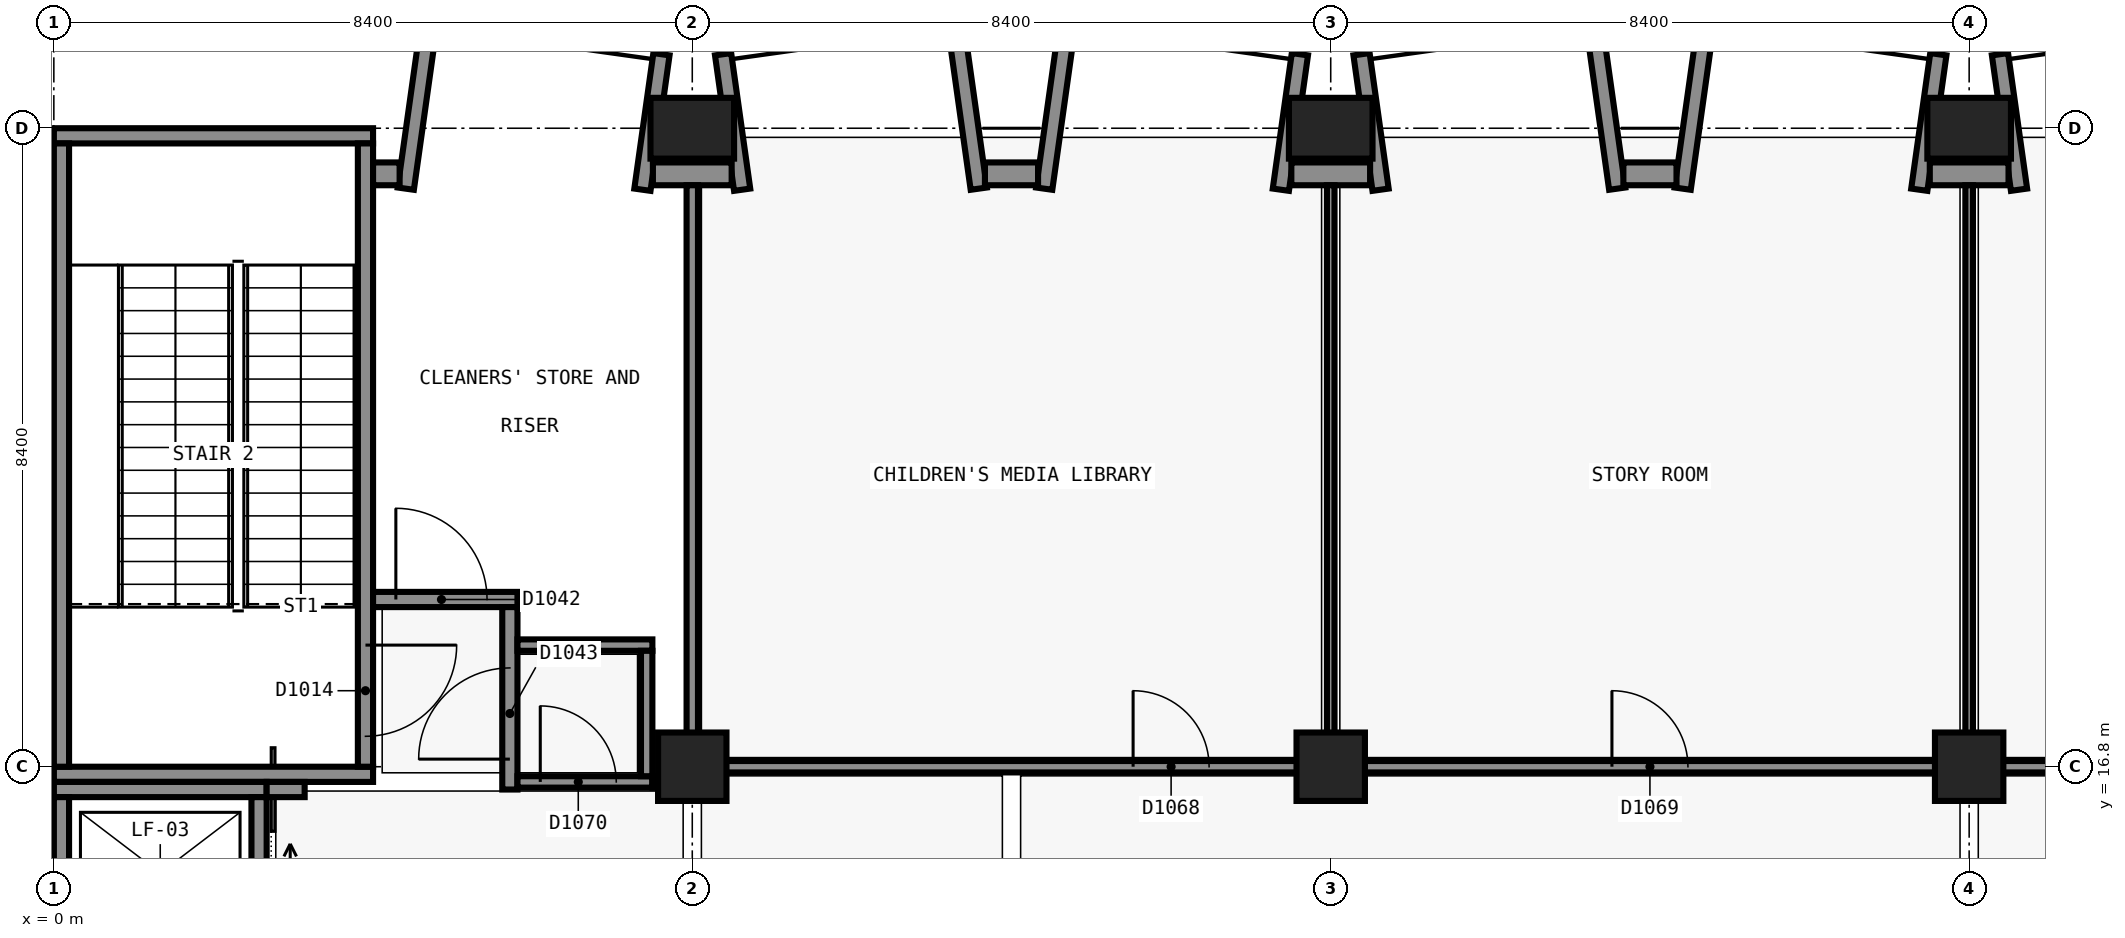
"""IFC4 building model, lengths in metres.
Left out: names, types, materials, properties, quantities, classifications, styles, units other than length and angle.
Written with IfcOpenShell. Run it as: python <this file> out.ifc"""

import sys

from ifc_helpers import new_model, si_unit, direction, frame, frame_2d, origin, origin_2d, place, context, subcontext, project, spatial, rectangle, extrude, element, fill, save


model = new_model("IFC4")
c1 = context("Model", 3, precision=1e-05, world=origin(), true_north=direction((0.0, 1.0)))
c2 = subcontext(c1, "Body", "Model", "MODEL_VIEW")
j1 = project(units=[si_unit("LENGTHUNIT", "METRE"), si_unit("PLANEANGLEUNIT", "RADIAN")], contexts=[c1])
p1 = place(None, origin())
s1 = spatial("IfcSite", under=j1, at=p1, CompositionType="ELEMENT")
p2 = place(p1, origin())
s2 = spatial("IfcBuilding", under=s1, at=p2, CompositionType="ELEMENT")
p3 = place(p2, frame((0.0, 0.0, 5.4)))
s3 = spatial("IfcBuildingStorey", under=s2, at=p3, CompositionType="ELEMENT", Elevation=5.4)
for number, where, z_axis, x_axis in (
    (1, (4.2, 16.7, 0.0), (0.0, 0.0, 1.0), (-1.0, 0.0, 0.0)),
    (2, (0.0, 25.1, 0.0), (0.0, 0.0, 1.0), (1.0, 0.0, 0.0)),
):
    element("IfcWall", number, at=place(p3, frame(where, z_axis=z_axis, x_axis=x_axis)), inside=s3, PredefinedType="SHEAR", context=c2, shape_type="SweptSolid", body=[
        extrude(rectangle(XDim=4.199, YDim=0.2, at=frame_2d((2.1, 0.0))), origin(), (0.0, 0.0, 1.0), 4.8),
    ])
p4 = place(p3, frame((0.1, 16.8, 0.0), z_axis=(0.0, 0.0, 1.0), x_axis=(0.0, 1.0, 0.0)))
e3 = element("IfcWall", 3, at=p4, inside=s3, PredefinedType="SHEAR", context=c2, shape_type="SweptSolid", body=[
    extrude(rectangle(XDim=8.2, YDim=0.2, at=frame_2d((4.1, 0.0))), origin(), (0.0, 0.0, 1.0), 4.8),
])
p5 = place(p3, frame((4.1, 25.0, 0.0), z_axis=(0.0, 0.0, 1.0), x_axis=(0.0, -1.0, 0.0)))
e4 = element("IfcWall", 4, at=p5, inside=s3, PredefinedType="SHEAR", context=c2, shape_type="SweptSolid", body=[
    extrude(rectangle(XDim=8.2, YDim=0.2, at=frame_2d((4.1, 0.0))), origin(), (0.0, 0.0, 1.0), 4.8),
])
p6 = place(p5, frame((6.6, 0.0, 0.0)))
e5 = element("IfcOpeningElement", 5, at=p6, cuts=e4, PredefinedType="OPENING", context=c2, shape_type="SweptSolid", body=[
    extrude(rectangle(XDim=1.2, YDim=2.1, at=frame_2d((0.6, 1.05))), frame((0.0, 0.11, 0.0), z_axis=(0.0, -1.0, 0.0), x_axis=(1.0, 0.0, 0.0)), (0.0, 0.0, 1.0), 0.22),
])
p7 = place(p3, frame((0.0, 16.5, 0.0), z_axis=(0.0, 0.0, 1.0), x_axis=(1.0, 0.0, 0.0)))
e6 = element("IfcWall", 6, at=p7, inside=s3, PredefinedType="SHEAR", context=c2, shape_type="SweptSolid", body=[
    extrude(rectangle(XDim=2.8, YDim=0.2, at=frame_2d((1.4, 0.0))), origin(), (0.0, 0.0, 1.0), 4.8),
])
p8 = place(p3, frame((0.1, 14.3, 0.0), z_axis=(0.0, 0.0, 1.0), x_axis=(0.0, 1.0, 0.0)))
e7 = element("IfcWall", 7, at=p8, inside=s3, PredefinedType="SHEAR", context=c2, shape_type="SweptSolid", body=[
    extrude(rectangle(XDim=2.1, YDim=0.2, at=frame_2d((1.05, 0.0))), origin(), (0.0, 0.0, 1.0), 4.8),
])
p9 = place(p3, frame((2.7, 16.4, 0.0), z_axis=(0.0, 0.0, 1.0), x_axis=(0.0, -1.0, 0.0)))
e8 = element("IfcWall", 8, at=p9, inside=s3, PredefinedType="SHEAR", context=c2, shape_type="SweptSolid", body=[
    extrude(rectangle(XDim=2.1, YDim=0.2, at=frame_2d((1.05, 0.0))), origin(), (0.0, 0.0, 1.0), 4.8),
])
p10 = place(p9, frame((0.45, 0.0, 0.0)))
e9 = element("IfcOpeningElement", 9, at=p10, cuts=e8, PredefinedType="OPENING", context=c2, shape_type="SweptSolid", body=[
    extrude(rectangle(XDim=1.1, YDim=2.1, at=frame_2d((0.55, 1.05))), frame((0.0, 0.11, 0.0), z_axis=(0.0, -1.0, 0.0), x_axis=(1.0, 0.0, 0.0)), (0.0, 0.0, 1.0), 0.22),
])
p11 = place(p3, frame((8.4, 16.8, 0.0), z_axis=(0.0, 0.0, 1.0), x_axis=(1.0, 0.0, 0.0)))
e10 = element("IfcColumn", 10, at=p11, inside=s3, PredefinedType="COLUMN", context=c2, shape_type="SweptSolid", body=[
    extrude(rectangle(XDim=0.9, YDim=0.9, at=origin_2d()), origin(), (0.0, 0.0, 1.0), 4.8),
])
p12 = place(p3, frame((8.4, 25.2, 0.0), z_axis=(0.0, 0.0, 1.0), x_axis=(1.0, 0.0, 0.0)))
e11 = element("IfcColumn", 11, at=p12, inside=s3, PredefinedType="COLUMN", context=c2, shape_type="SweptSolid", body=[
    extrude(rectangle(XDim=1.1, YDim=0.8, at=origin_2d()), origin(), (0.0, 0.0, 1.0), 4.8),
])
p13 = place(p3, frame((16.8, 16.8, 0.0), z_axis=(0.0, 0.0, 1.0), x_axis=(1.0, 0.0, 0.0)))
e12 = element("IfcColumn", 12, at=p13, inside=s3, PredefinedType="COLUMN", context=c2, shape_type="SweptSolid", body=[
    extrude(rectangle(XDim=0.9, YDim=0.9, at=origin_2d()), origin(), (0.0, 0.0, 1.0), 4.8),
])
p14 = place(p3, frame((16.8, 25.2, 0.0), z_axis=(0.0, 0.0, 1.0), x_axis=(1.0, 0.0, 0.0)))
e13 = element("IfcColumn", 13, at=p14, inside=s3, PredefinedType="COLUMN", context=c2, shape_type="SweptSolid", body=[
    extrude(rectangle(XDim=1.1, YDim=0.8, at=origin_2d()), origin(), (0.0, 0.0, 1.0), 4.8),
])
p15 = place(p3, frame((25.2, 16.8, 0.0), z_axis=(0.0, 0.0, 1.0), x_axis=(1.0, 0.0, 0.0)))
e14 = element("IfcColumn", 14, at=p15, inside=s3, PredefinedType="COLUMN", context=c2, shape_type="SweptSolid", body=[
    extrude(rectangle(XDim=0.9, YDim=0.9, at=origin_2d()), origin(), (0.0, 0.0, 1.0), 4.8),
])
p16 = place(p3, frame((25.2, 25.2, 0.0), z_axis=(0.0, 0.0, 1.0), x_axis=(1.0, 0.0, 0.0)))
e15 = element("IfcColumn", 15, at=p16, inside=s3, PredefinedType="COLUMN", context=c2, shape_type="SweptSolid", body=[
    extrude(rectangle(XDim=1.1, YDim=0.8, at=origin_2d()), origin(), (0.0, 0.0, 1.0), 4.8),
])
p17 = place(p3, frame((2.8, 16.5, 0.0), z_axis=(0.0, 0.0, 1.0), x_axis=(1.0, 0.0, 0.0)))
e16 = element("IfcWall", 16, at=p17, inside=s3, PredefinedType="SHEAR", context=c2, shape_type="SweptSolid", body=[
    extrude(rectangle(XDim=0.5, YDim=0.2, at=frame_2d((0.25, 0.0))), origin(), (0.0, 0.0, 1.0), 4.8),
])
p18 = place(p3, frame((4.631, 24.405, 0.0), z_axis=(0.0, 0.0, 1.0), x_axis=(0.139141913905, 0.990272451295, 0.0)))
e17 = element("IfcWall", 17, at=p18, inside=s3, PredefinedType="SOLIDWALL", context=c2, shape_type="SweptSolid", body=[
    extrude(rectangle(XDim=2.219, YDim=0.215, at=frame_2d((1.11, 0.0))), origin(), (0.0, 0.0, 1.0), 4.5),
])
for number, where, z_axis, x_axis in (
    (18, (7.744, 24.391, 0.0), (0.0, 0.0, 1.0), (0.139, 0.99, 0.0)),
    (19, (9.056, 24.391, 0.0), (0.0, 0.0, 1.0), (-0.139, 0.99, 0.0)),
):
    element("IfcWall", number, at=place(p3, frame(where, z_axis=z_axis, x_axis=x_axis)), inside=s3, PredefinedType="SOLIDWALL", context=c2, shape_type="SweptSolid", body=[
        extrude(rectangle(XDim=1.8, YDim=0.215, at=frame_2d((0.9, 0.0))), origin(), (0.0, 0.0, 1.0), 4.5),
    ])
p19 = place(p3, frame((12.169, 24.405, 0.0), z_axis=(0.0, 0.0, 1.0), x_axis=(-0.139141913905, 0.990272451295, 0.0)))
e20 = element("IfcWall", 20, at=p19, inside=s3, PredefinedType="SOLIDWALL", context=c2, shape_type="SweptSolid", body=[
    extrude(rectangle(XDim=2.219, YDim=0.215, at=frame_2d((1.11, 0.0))), origin(), (0.0, 0.0, 1.0), 4.5),
])
p20 = place(p3, frame((13.031, 24.405, 0.0), z_axis=(0.0, 0.0, 1.0), x_axis=(0.139249775508, 0.99025728981, 0.0)))
e21 = element("IfcWall", 21, at=p20, inside=s3, PredefinedType="SOLIDWALL", context=c2, shape_type="SweptSolid", body=[
    extrude(rectangle(XDim=2.22, YDim=0.215, at=frame_2d((1.11, 0.0))), origin(), (0.0, 0.0, 1.0), 4.5),
])
for number, where, z_axis, x_axis in (
    (22, (16.144, 24.391, 0.0), (0.0, 0.0, 1.0), (0.139, 0.99, 0.0)),
    (23, (17.456, 24.391, 0.0), (0.0, 0.0, 1.0), (-0.139, 0.99, 0.0)),
):
    element("IfcWall", number, at=place(p3, frame(where, z_axis=z_axis, x_axis=x_axis)), inside=s3, PredefinedType="SOLIDWALL", context=c2, shape_type="SweptSolid", body=[
        extrude(rectangle(XDim=1.8, YDim=0.215, at=frame_2d((0.9, 0.0))), origin(), (0.0, 0.0, 1.0), 4.5),
    ])
for number, where, z_axis, x_axis in (
    (24, (20.569, 24.405, 0.0), (0.0, 0.0, 1.0), (-0.139, 0.99, 0.0)),
    (25, (21.431, 24.405, 0.0), (0.0, 0.0, 1.0), (0.139, 0.99, 0.0)),
):
    element("IfcWall", number, at=place(p3, frame(where, z_axis=z_axis, x_axis=x_axis)), inside=s3, PredefinedType="SOLIDWALL", context=c2, shape_type="SweptSolid", body=[
        extrude(rectangle(XDim=2.219, YDim=0.215, at=frame_2d((1.11, 0.0))), origin(), (0.0, 0.0, 1.0), 4.5),
    ])
for number, where, z_axis, x_axis in (
    (26, (24.544, 24.391, 0.0), (0.0, 0.0, 1.0), (0.139, 0.99, 0.0)),
    (27, (25.856, 24.391, 0.0), (0.0, 0.0, 1.0), (-0.139, 0.99, 0.0)),
):
    element("IfcWall", number, at=place(p3, frame(where, z_axis=z_axis, x_axis=x_axis)), inside=s3, PredefinedType="SOLIDWALL", context=c2, shape_type="SweptSolid", body=[
        extrude(rectangle(XDim=1.8, YDim=0.215, at=frame_2d((0.9, 0.0))), origin(), (0.0, 0.0, 1.0), 4.5),
    ])
p21 = place(p3, frame((4.2, 24.6, 0.0), z_axis=(0.0, 0.0, 1.0), x_axis=(1.0, 0.0, 0.0)))
e28 = element("IfcWall", 28, at=p21, inside=s3, PredefinedType="SOLIDWALL", context=c2, shape_type="SweptSolid", body=[
    extrude(rectangle(XDim=0.349, YDim=0.3, at=frame_2d((0.175, 0.0))), origin(), (0.0, 0.0, 1.0), 4.5),
])
p22 = place(p3, frame((7.882, 24.6, 0.0), z_axis=(0.0, 0.0, 1.0), x_axis=(1.0, 0.0, 0.0)))
e29 = element("IfcWall", 29, at=p22, inside=s3, PredefinedType="SOLIDWALL", context=c2, shape_type="SweptSolid", body=[
    extrude(rectangle(XDim=1.036, YDim=0.3, at=frame_2d((0.518, 0.0))), origin(), (0.0, 0.0, 1.0), 4.5),
])
p23 = place(p3, frame((12.25, 24.6, 0.0), z_axis=(0.0, 0.0, 1.0), x_axis=(1.0, 0.0, 0.0)))
e30 = element("IfcWall", 30, at=p23, inside=s3, PredefinedType="SOLIDWALL", context=c2, shape_type="SweptSolid", body=[
    extrude(rectangle(XDim=0.699, YDim=0.3, at=frame_2d((0.35, 0.0))), origin(), (0.0, 0.0, 1.0), 4.5),
])
p24 = place(p3, frame((16.282, 24.6, 0.0), z_axis=(0.0, 0.0, 1.0), x_axis=(1.0, 0.0, 0.0)))
e31 = element("IfcWall", 31, at=p24, inside=s3, PredefinedType="SOLIDWALL", context=c2, shape_type="SweptSolid", body=[
    extrude(rectangle(XDim=1.036, YDim=0.3, at=frame_2d((0.518, 0.0))), origin(), (0.0, 0.0, 1.0), 4.5),
])
p25 = place(p3, frame((20.65, 24.6, 0.0), z_axis=(0.0, 0.0, 1.0), x_axis=(1.0, 0.0, 0.0)))
e32 = element("IfcWall", 32, at=p25, inside=s3, PredefinedType="SOLIDWALL", context=c2, shape_type="SweptSolid", body=[
    extrude(rectangle(XDim=0.699, YDim=0.3, at=frame_2d((0.35, 0.0))), origin(), (0.0, 0.0, 1.0), 4.5),
])
p26 = place(p3, frame((24.682, 24.6, 0.0), z_axis=(0.0, 0.0, 1.0), x_axis=(1.0, 0.0, 0.0)))
e33 = element("IfcWall", 33, at=p26, inside=s3, PredefinedType="SOLIDWALL", context=c2, shape_type="SweptSolid", body=[
    extrude(rectangle(XDim=1.036, YDim=0.3, at=frame_2d((0.518, 0.0))), origin(), (0.0, 0.0, 1.0), 4.5),
])
p27 = place(p3, frame((4.2, 19.0, 0.0), z_axis=(0.0, 0.0, 1.0), x_axis=(1.0, 0.0, 0.0)))
e34 = element("IfcWall", 34, at=p27, inside=s3, PredefinedType="SOLIDWALL", context=c2, shape_type="SweptSolid", body=[
    extrude(rectangle(XDim=1.9, YDim=0.2, at=frame_2d((0.95, 0.0))), origin(), (0.0, 0.0, 1.0), 4.5),
])
p28 = place(p27, frame((0.3, 0.0, 0.0)))
e35 = element("IfcOpeningElement", 35, at=p28, cuts=e34, PredefinedType="OPENING", context=c2, shape_type="SweptSolid", body=[
    extrude(rectangle(XDim=1.2, YDim=2.1, at=frame_2d((0.6, 1.05))), frame((0.0, 0.11, 0.0), z_axis=(0.0, -1.0, 0.0), x_axis=(1.0, 0.0, 0.0)), (0.0, 0.0, 1.0), 0.22),
])
p29 = place(p3, frame((6.0, 16.5, 0.0), z_axis=(0.0, 0.0, 1.0), x_axis=(0.0, 1.0, 0.0)))
e36 = element("IfcWall", 36, at=p29, inside=s3, PredefinedType="SOLIDWALL", context=c2, shape_type="SweptSolid", body=[
    extrude(rectangle(XDim=2.4, YDim=0.2, at=frame_2d((1.2, 0.0))), origin(), (0.0, 0.0, 1.0), 4.0),
])
p30 = place(p29, frame((0.4, 0.0, 0.0)))
e37 = element("IfcOpeningElement", 37, at=p30, cuts=e36, PredefinedType="OPENING", context=c2, shape_type="SweptSolid", body=[
    extrude(rectangle(XDim=1.2, YDim=2.1, at=frame_2d((0.6, 1.05))), frame((0.0, 0.11, 0.0), z_axis=(0.0, -1.0, 0.0), x_axis=(1.0, 0.0, 0.0)), (0.0, 0.0, 1.0), 0.22),
])
p31 = place(p3, frame((6.1, 16.6, 0.0), z_axis=(0.0, 0.0, 1.0), x_axis=(1.0, 0.0, 0.0)))
e38 = element("IfcWall", 38, at=p31, inside=s3, PredefinedType="PARTITIONING", context=c2, shape_type="SweptSolid", body=[
    extrude(rectangle(XDim=1.775, YDim=0.15, at=frame_2d((0.887, 0.0))), origin(), (0.0, 0.0, 1.0), 4.0),
])
p32 = place(p31, frame((0.3, 0.0, 0.0)))
e39 = element("IfcOpeningElement", 39, at=p32, cuts=e38, PredefinedType="OPENING", context=c2, shape_type="SweptSolid", body=[
    extrude(rectangle(XDim=1.0, YDim=2.1, at=frame_2d((0.5, 1.05))), frame((0.0, 0.085, 0.0), z_axis=(0.0, -1.0, 0.0), x_axis=(1.0, 0.0, 0.0)), (0.0, 0.0, 1.0), 0.17),
])
p33 = place(p3, frame((8.325, 16.8, 0.0), z_axis=(0.0, 0.0, 1.0), x_axis=(1.0, 0.0, 0.0)))
e40 = element("IfcWall", 40, at=p33, inside=s3, PredefinedType="PARTITIONING", context=c2, shape_type="SweptSolid", body=[
    extrude(rectangle(XDim=25.15, YDim=0.15, at=frame_2d((12.575, 0.0))), origin(), (0.0, 0.0, 1.0), 3.8),
])
p34 = place(p33, frame((20.575, 0.0, 0.0)))
e41 = element("IfcOpeningElement", 41, at=p34, cuts=e40, PredefinedType="OPENING", context=c2, shape_type="SweptSolid", body=[
    extrude(rectangle(XDim=1.0, YDim=2.1, at=frame_2d((0.5, 1.05))), frame((0.0, 0.085, 0.0), z_axis=(0.0, -1.0, 0.0), x_axis=(1.0, 0.0, 0.0)), (0.0, 0.0, 1.0), 0.17),
])
p35 = place(p33, frame((5.875, 0.0, 0.0)))
e42 = element("IfcOpeningElement", 42, at=p35, cuts=e40, PredefinedType="OPENING", context=c2, shape_type="SweptSolid", body=[
    extrude(rectangle(XDim=1.0, YDim=2.1, at=frame_2d((0.5, 1.05))), frame((0.0, 0.085, 0.0), z_axis=(0.0, -1.0, 0.0), x_axis=(1.0, 0.0, 0.0)), (0.0, 0.0, 1.0), 0.17),
])
p36 = place(p33, frame((12.175, 0.0, 0.0)))
e43 = element("IfcOpeningElement", 43, at=p36, cuts=e40, PredefinedType="OPENING", context=c2, shape_type="SweptSolid", body=[
    extrude(rectangle(XDim=1.0, YDim=2.1, at=frame_2d((0.5, 1.05))), frame((0.0, 0.085, 0.0), z_axis=(0.0, -1.0, 0.0), x_axis=(1.0, 0.0, 0.0)), (0.0, 0.0, 1.0), 0.17),
])
p37 = place(p3, frame((7.875, 16.6, 0.0), z_axis=(0.0, 0.0, 1.0), x_axis=(1.0, 0.0, 0.0)))
e44 = element("IfcWall", 44, at=p37, inside=s3, PredefinedType="SOLIDWALL", context=c2, shape_type="SweptSolid", body=[
    extrude(rectangle(XDim=0.6, YDim=0.15, at=frame_2d((0.3, 0.0))), origin(), (0.0, 0.0, 1.0), 3.8),
])
p38 = place(p3, frame((6.1, 18.4, 0.0), z_axis=(0.0, 0.0, 1.0), x_axis=(1.0, 0.0, 0.0)))
e45 = element("IfcWall", 45, at=p38, inside=s3, PredefinedType="SOLIDWALL", context=c2, shape_type="SweptSolid", body=[
    extrude(rectangle(XDim=1.775, YDim=0.15, at=frame_2d((0.887, 0.0))), origin(), (0.0, 0.0, 1.0), 4.5),
])
p39 = place(p3, frame((7.8, 16.675, 0.0), z_axis=(0.0, 0.0, 1.0), x_axis=(0.0, 1.0, 0.0)))
e46 = element("IfcWall", 46, at=p39, inside=s3, PredefinedType="SOLIDWALL", context=c2, shape_type="SweptSolid", body=[
    extrude(rectangle(XDim=1.65, YDim=0.15, at=frame_2d((0.825, 0.0))), origin(), (0.0, 0.0, 1.0), 4.0),
])
p40 = place(p3, frame((8.4, 16.875, 0.0), z_axis=(0.0, 0.0, 1.0), x_axis=(0.0, 1.0, 0.0)))
e47 = element("IfcWall", 47, at=p40, inside=s3, PredefinedType="SOLIDWALL", context=c2, shape_type="SweptSolid", body=[
    extrude(rectangle(XDim=7.575, YDim=0.15, at=frame_2d((3.788, 0.0))), origin(), (0.0, 0.0, 1.0), 3.8),
])
for number, where, z_axis, x_axis in (
    (48, (16.8, 16.875, 0.0), (0.0, 0.0, 1.0), (0.0, 1.0, 0.0)),
    (49, (25.2, 16.875, 0.0), (0.0, 0.0, 1.0), (0.0, 1.0, 0.0)),
):
    element("IfcWall", number, at=place(p3, frame(where, z_axis=z_axis, x_axis=x_axis)), inside=s3, PredefinedType="PARTITIONING", context=c2, shape_type="SweptSolid", body=[
        extrude(rectangle(XDim=7.575, YDim=0.1, at=frame_2d((3.788, 0.0))), origin(), (0.0, 0.0, 1.0), 3.8),
    ])
p41 = place(p10, origin())
e50 = element("IfcDoor", 50, at=p41, inside=s3, OperationType="SLIDING_TO_LEFT", PredefinedType="DOOR", context=c2, shape_type="SweptSolid", body=[
    extrude(rectangle(XDim=1.1, YDim=2.1, at=frame_2d((0.55, 1.05))), frame((0.0, 0.025, 0.0), z_axis=(0.0, -1.0, 0.0), x_axis=(1.0, 0.0, 0.0)), (0.0, 0.0, 1.0), 0.05),
])
fill(e9, e50)
p42 = place(p6, origin())
e51 = element("IfcDoor", 51, at=p42, inside=s3, OperationType="SINGLE_SWING_RIGHT", PredefinedType="DOOR", context=c2, shape_type="SweptSolid", body=[
    extrude(rectangle(XDim=1.2, YDim=2.1, at=frame_2d((0.6, 1.05))), frame((0.0, 0.025, 0.0), z_axis=(0.0, -1.0, 0.0), x_axis=(1.0, 0.0, 0.0)), (0.0, 0.0, 1.0), 0.05),
])
fill(e5, e51)
p43 = place(p28, origin())
e52 = element("IfcDoor", 52, at=p43, inside=s3, OperationType="SINGLE_SWING_LEFT", PredefinedType="DOOR", context=c2, shape_type="SweptSolid", body=[
    extrude(rectangle(XDim=1.2, YDim=2.1, at=frame_2d((0.6, 1.05))), frame((0.0, 0.025, 0.0), z_axis=(0.0, -1.0, 0.0), x_axis=(1.0, 0.0, 0.0)), (0.0, 0.0, 1.0), 0.05),
])
fill(e35, e52)
p44 = place(p30, origin())
e53 = element("IfcDoor", 53, at=p44, inside=s3, OperationType="SINGLE_SWING_RIGHT", PredefinedType="DOOR", context=c2, shape_type="SweptSolid", body=[
    extrude(rectangle(XDim=1.2, YDim=2.1, at=frame_2d((0.6, 1.05))), frame((0.0, 0.025, 0.0), z_axis=(0.0, -1.0, 0.0), x_axis=(1.0, 0.0, 0.0)), (0.0, 0.0, 1.0), 0.05),
])
fill(e37, e53)
p45 = place(p35, origin())
e54 = element("IfcDoor", 54, at=p45, inside=s3, OperationType="SINGLE_SWING_LEFT", PredefinedType="DOOR", context=c2, shape_type="SweptSolid", body=[
    extrude(rectangle(XDim=1.0, YDim=2.1, at=frame_2d((0.5, 1.05))), frame((0.0, 0.025, 0.0), z_axis=(0.0, -1.0, 0.0), x_axis=(1.0, 0.0, 0.0)), (0.0, 0.0, 1.0), 0.05),
])
fill(e42, e54)
p46 = place(p36, origin())
e55 = element("IfcDoor", 55, at=p46, inside=s3, OperationType="SINGLE_SWING_RIGHT", PredefinedType="DOOR", context=c2, shape_type="SweptSolid", body=[
    extrude(rectangle(XDim=1.0, YDim=2.1, at=frame_2d((0.5, 1.05))), frame((0.0, 0.025, 0.0), z_axis=(0.0, -1.0, 0.0), x_axis=(1.0, 0.0, 0.0)), (0.0, 0.0, 1.0), 0.05),
])
fill(e43, e55)
p47 = place(p32, origin())
e56 = element("IfcDoor", 56, at=p47, inside=s3, OperationType="SINGLE_SWING_RIGHT", PredefinedType="DOOR", context=c2, shape_type="SweptSolid", body=[
    extrude(rectangle(XDim=1.0, YDim=2.1, at=frame_2d((0.5, 1.05))), frame((0.0, 0.025, 0.0), z_axis=(0.0, -1.0, 0.0), x_axis=(1.0, 0.0, 0.0)), (0.0, 0.0, 1.0), 0.05),
])
fill(e39, e56)
save(model, sys.argv[1])
